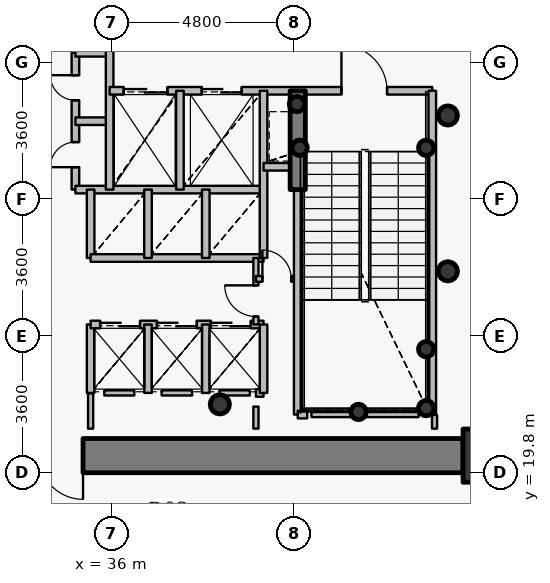
"""IFC4 building model, lengths in metres.
Left out: names, types, materials, properties, quantities, classifications, styles, units other than length and angle.
Written with IfcOpenShell. Run it as: python <this file> out.ifc"""

import sys

from ifc_helpers import new_model, si_unit, direction, frame, frame_2d, origin, origin_2d, place, context, subcontext, project, spatial, rectangle, hollow_circle, extrude, source, transform, mapped, element, fill, save


model = new_model("IFC4")
c1 = context("Model", 3, precision=1e-05, world=origin(), true_north=direction((0.0, 1.0)))
c2 = subcontext(c1, "Body", "Model", "MODEL_VIEW")
j1 = project(units=[si_unit("LENGTHUNIT", "METRE"), si_unit("PLANEANGLEUNIT", "RADIAN")], contexts=[c1])
p1 = place(None, origin())
s1 = spatial("IfcSite", under=j1, at=p1, CompositionType="ELEMENT")
p2 = place(p1, origin())
s2 = spatial("IfcBuilding", under=s1, at=p2, CompositionType="ELEMENT")
p3 = place(p2, frame((0.0, 0.0, 82.8)))
s3 = spatial("IfcBuildingStorey", under=s2, at=p3, CompositionType="ELEMENT", Elevation=82.8)
p4 = place(p3, frame((45.95, 20.25, 0.0), z_axis=(0.0, 0.0, 1.0), x_axis=(1.0, 0.0, 0.0)))
e1 = element("IfcColumn", 1, at=p4, inside=s3, PredefinedType="COLUMN", context=c2, shape_type="SweptSolid", body=[
    extrude(rectangle(XDim=1.4, YDim=1.4, at=origin_2d()), origin(), (0.0, 0.0, 1.0), 4.2),
])
p5 = place(p3, frame((38.85, 21.6, 0.0), z_axis=(0.0, 0.0, 1.0), x_axis=(1.0, 0.0, 0.0)))
e2 = element("IfcColumn", 2, at=p5, inside=s3, PredefinedType="COLUMN", context=c2, shape_type="SweptSolid", body=[
    extrude(hollow_circle(Radius=0.254, WallThickness=0.02, at=origin_2d()), origin(), (0.0, 0.0, 1.0), 4.2),
])
for number, where, z_axis, x_axis in (
    (3, (44.28, 21.5, 0.0), (0.0, 0.0, 1.0), (1.0, 0.0, 0.0)),
    (4, (44.28, 23.05, 0.0), (0.0, 0.0, 1.0), (1.0, 0.0, 0.0)),
    (5, (42.5, 21.4, 0.0), (0.0, 0.0, 1.0), (1.0, 0.0, 0.0)),
    (6, (40.95, 28.35, 0.0), (0.0, 0.0, 1.0), (1.0, 0.0, 0.0)),
    (7, (44.28, 28.35, 0.0), (0.0, 0.0, 1.0), (1.0, 0.0, 0.0)),
    (8, (40.88, 29.5, 0.0), (0.0, 0.0, 1.0), (1.0, 0.0, 0.0)),
):
    element("IfcColumn", number, at=place(p3, frame(where, z_axis=z_axis, x_axis=x_axis)), inside=s3, PredefinedType="COLUMN", context=c2, shape_type="SweptSolid", body=[
        extrude(hollow_circle(Radius=0.203, WallThickness=0.016, at=origin_2d()), origin(), (0.0, 0.0, 1.0), 4.2),
    ])
p6 = place(p3, frame((45.25, 20.25, 0.0), z_axis=(0.0, 0.0, 1.0), x_axis=(-1.0, 0.0, 0.0)))
e9 = element("IfcWall", 9, at=p6, inside=s3, PredefinedType="SHEAR", context=c2, shape_type="SweptSolid", body=[
    extrude(rectangle(XDim=18.5, YDim=0.9, at=frame_2d((9.25, 0.0))), origin(), (0.0, 0.0, 1.0), 3.35),
])
p7 = place(p6, frame((10.0, 0.0, 0.0)))
e10 = element("IfcOpeningElement", 10, at=p7, cuts=e9, PredefinedType="OPENING", context=c2, shape_type="SweptSolid", body=[
    extrude(rectangle(XDim=1.15, YDim=2.15, at=origin_2d()), frame((0.575, 0.46, 1.075), z_axis=(0.0, -1.0, 0.0), x_axis=(1.0, 0.0, 0.0)), (0.0, 0.0, 1.0), 0.92),
])
p8 = place(p3, frame((40.9, 27.25, 0.0), z_axis=(0.0, 0.0, 1.0), x_axis=(0.0, 1.0, 0.0)))
e11 = element("IfcWall", 11, at=p8, inside=s3, PredefinedType="SHEAR", context=c2, shape_type="SweptSolid", body=[
    extrude(rectangle(XDim=2.6, YDim=0.4, at=frame_2d((1.3, 0.0))), origin(), (0.0, 0.0, 1.0), 3.5),
])
for number, where, z_axis, x_axis in (
    (12, (44.85, 25.1, 0.0), (0.0, 0.0, 1.0), (1.0, 0.0, 0.0)),
    (13, (44.85, 29.2, 0.0), (0.0, 0.0, 1.0), (1.0, 0.0, 0.0)),
):
    element("IfcColumn", number, at=place(p3, frame(where, z_axis=z_axis, x_axis=x_axis)), inside=s3, PredefinedType="COLUMN", context=c2, shape_type="SweptSolid", body=[
        extrude(hollow_circle(Radius=0.254, WallThickness=0.02, at=origin_2d()), origin(), (0.0, 0.0, 1.0), 4.2),
    ])
p9 = place(p3, frame((35.05, 27.25, 0.0), z_axis=(0.0, 0.0, 1.0), x_axis=(0.0, 1.0, 0.0)))
e14 = element("IfcWall", 14, at=p9, inside=s3, PredefinedType="PARTITIONING", context=c2, shape_type="SweptSolid", body=[
    extrude(rectangle(XDim=3.6, YDim=0.2, at=frame_2d((1.8, 0.0))), origin(), (0.0, 0.0, 1.0), 3.9),
])
p10 = place(p9, frame((0.59, 0.0, 0.0)))
e15 = element("IfcOpeningElement", 15, at=p10, cuts=e14, PredefinedType="OPENING", context=c2, shape_type="SweptSolid", body=[
    extrude(rectangle(XDim=0.66, YDim=2.05, at=origin_2d()), frame((0.33, 0.11, 1.025), z_axis=(0.0, -1.0, 0.0), x_axis=(1.0, 0.0, 0.0)), (0.0, 0.0, 1.0), 0.22),
])
p11 = place(p9, frame((2.35, 0.0, 0.0)))
e16 = element("IfcOpeningElement", 16, at=p11, cuts=e14, PredefinedType="OPENING", context=c2, shape_type="SweptSolid", body=[
    extrude(rectangle(XDim=0.66, YDim=2.05, at=origin_2d()), frame((0.33, 0.11, 1.025), z_axis=(0.0, -1.0, 0.0), x_axis=(1.0, 0.0, 0.0)), (0.0, 0.0, 1.0), 0.22),
])
p12 = place(p3, frame((35.05, 27.25, 0.0), z_axis=(0.0, 0.0, 1.0), x_axis=(1.0, 0.0, 0.0)))
e17 = element("IfcWall", 17, at=p12, inside=s3, PredefinedType="PARTITIONING", context=c2, shape_type="SweptSolid", body=[
    extrude(rectangle(XDim=4.95, YDim=0.2, at=frame_2d((2.475, 0.0))), origin(), (0.0, 0.0, 1.0), 3.485),
])
for number, where, z_axis, x_axis in (
    (18, (35.05, 29.05, 0.0), (0.0, 0.0, 1.0), (1.0, 0.0, 0.0)),
    (19, (35.05, 30.85, 0.0), (0.0, 0.0, 1.0), (1.0, 0.0, 0.0)),
):
    element("IfcWall", number, at=place(p3, frame(where, z_axis=z_axis, x_axis=x_axis)), inside=s3, PredefinedType="PARTITIONING", context=c2, shape_type="SweptSolid", body=[
        extrude(rectangle(XDim=0.9, YDim=0.2, at=frame_2d((0.45, 0.0))), origin(), (0.0, 0.0, 1.0), 3.9),
    ])
p13 = place(p3, frame((35.45, 21.9, 0.0), z_axis=(0.0, 0.0, 1.0), x_axis=(0.0, 1.0, 0.0)))
e20 = element("IfcWall", 20, at=p13, inside=s3, PredefinedType="PARTITIONING", context=c2, shape_type="SweptSolid", body=[
    extrude(rectangle(XDim=1.8, YDim=0.2, at=frame_2d((0.9, 0.0))), origin(), (0.0, 0.0, 1.0), 3.9),
])
p14 = place(p3, frame((35.45, 23.7, 0.0), z_axis=(0.0, 0.0, 1.0), x_axis=(1.0, 0.0, 0.0)))
e21 = element("IfcWall", 21, at=p14, inside=s3, PredefinedType="PARTITIONING", context=c2, shape_type="SweptSolid", body=[
    extrude(rectangle(XDim=4.55, YDim=0.2, at=frame_2d((2.275, 0.0))), origin(), (0.0, 0.0, 1.0), 3.485),
])
p15 = place(p14, frame((0.25, 0.0, 0.0)))
e22 = element("IfcOpeningElement", 22, at=p15, cuts=e21, PredefinedType="OPENING", context=c2, shape_type="SweptSolid", body=[
    extrude(rectangle(XDim=1.05, YDim=2.15, at=origin_2d()), frame((0.525, 0.11, 1.075), z_axis=(0.0, -1.0, 0.0), x_axis=(1.0, 0.0, 0.0)), (0.0, 0.0, 1.0), 0.22),
])
p16 = place(p14, frame((1.745, 0.0, 0.0)))
e23 = element("IfcOpeningElement", 23, at=p16, cuts=e21, PredefinedType="OPENING", context=c2, shape_type="SweptSolid", body=[
    extrude(rectangle(XDim=1.05, YDim=2.15, at=origin_2d()), frame((0.525, 0.11, 1.075), z_axis=(0.0, -1.0, 0.0), x_axis=(1.0, 0.0, 0.0)), (0.0, 0.0, 1.0), 0.22),
])
p17 = place(p14, frame((3.165, 0.0, 0.0)))
e24 = element("IfcOpeningElement", 24, at=p17, cuts=e21, PredefinedType="OPENING", context=c2, shape_type="SweptSolid", body=[
    extrude(rectangle(XDim=1.05, YDim=2.15, at=origin_2d()), frame((0.525, 0.11, 1.075), z_axis=(0.0, -1.0, 0.0), x_axis=(1.0, 0.0, 0.0)), (0.0, 0.0, 1.0), 0.22),
])
p18 = place(p3, frame((35.45, 25.45, 0.0), z_axis=(0.0, 0.0, 1.0), x_axis=(0.0, 1.0, 0.0)))
e25 = element("IfcWall", 25, at=p18, inside=s3, PredefinedType="PARTITIONING", context=c2, shape_type="SweptSolid", body=[
    extrude(rectangle(XDim=1.8, YDim=0.2, at=frame_2d((0.9, 0.0))), origin(), (0.0, 0.0, 1.0), 3.9),
])
p19 = place(p3, frame((35.45, 25.45, 0.0), z_axis=(0.0, 0.0, 1.0), x_axis=(1.0, 0.0, 0.0)))
e26 = element("IfcWall", 26, at=p19, inside=s3, PredefinedType="PARTITIONING", context=c2, shape_type="SweptSolid", body=[
    extrude(rectangle(XDim=4.55, YDim=0.2, at=frame_2d((2.275, 0.0))), origin(), (0.0, 0.0, 1.0), 3.485),
])
p20 = place(p3, frame((35.95, 27.25, 0.0), z_axis=(0.0, 0.0, 1.0), x_axis=(0.0, 1.0, 0.0)))
e27 = element("IfcWall", 27, at=p20, inside=s3, PredefinedType="PARTITIONING", context=c2, shape_type="SweptSolid", body=[
    extrude(rectangle(XDim=3.8, YDim=0.2, at=frame_2d((1.9, 0.0))), origin(), (0.0, 0.0, 1.0), 3.9),
])
p21 = place(p3, frame((35.95, 29.85, 0.0), z_axis=(0.0, 0.0, 1.0), x_axis=(1.0, 0.0, 0.0)))
e28 = element("IfcWall", 28, at=p21, inside=s3, PredefinedType="PARTITIONING", context=c2, shape_type="SweptSolid", body=[
    extrude(rectangle(XDim=8.49, YDim=0.2, at=frame_2d((4.245, 0.0))), origin(), (0.0, 0.0, 1.0), 3.485),
])
p22 = place(p21, frame((6.1, 0.0, 0.0)))
e29 = element("IfcOpeningElement", 29, at=p22, cuts=e28, PredefinedType="OPENING", context=c2, shape_type="SweptSolid", body=[
    extrude(rectangle(XDim=1.2, YDim=2.15, at=origin_2d()), frame((0.6, 0.11, 1.075), z_axis=(0.0, -1.0, 0.0), x_axis=(1.0, 0.0, 0.0)), (0.0, 0.0, 1.0), 0.22),
])
p23 = place(p21, frame((0.37, 0.0, 0.0)))
e30 = element("IfcOpeningElement", 30, at=p23, cuts=e28, PredefinedType="OPENING", context=c2, shape_type="SweptSolid", body=[
    extrude(rectangle(XDim=1.15, YDim=2.15, at=origin_2d()), frame((0.575, 0.11, 1.075), z_axis=(0.0, -1.0, 0.0), x_axis=(1.0, 0.0, 0.0)), (0.0, 0.0, 1.0), 0.22),
])
p24 = place(p21, frame((2.425, 0.0, 0.0)))
e31 = element("IfcOpeningElement", 31, at=p24, cuts=e28, PredefinedType="OPENING", context=c2, shape_type="SweptSolid", body=[
    extrude(rectangle(XDim=1.05, YDim=2.15, at=origin_2d()), frame((0.525, 0.11, 1.075), z_axis=(0.0, -1.0, 0.0), x_axis=(1.0, 0.0, 0.0)), (0.0, 0.0, 1.0), 0.22),
])
for number, where, z_axis, x_axis in (
    (32, (36.96, 21.9, 0.0), (0.0, 0.0, 1.0), (0.0, 1.0, 0.0)),
    (33, (36.96, 25.45, 0.0), (0.0, 0.0, 1.0), (0.0, 1.0, 0.0)),
):
    element("IfcWall", number, at=place(p3, frame(where, z_axis=z_axis, x_axis=x_axis)), inside=s3, PredefinedType="PARTITIONING", context=c2, shape_type="SweptSolid", body=[
        extrude(rectangle(XDim=1.8, YDim=0.2, at=frame_2d((0.9, 0.0))), origin(), (0.0, 0.0, 1.0), 3.9),
    ])
p25 = place(p3, frame((37.8, 27.25, 0.0), z_axis=(0.0, 0.0, 1.0), x_axis=(0.0, 1.0, 0.0)))
e34 = element("IfcWall", 34, at=p25, inside=s3, PredefinedType="PARTITIONING", context=c2, shape_type="SweptSolid", body=[
    extrude(rectangle(XDim=2.6, YDim=0.2, at=frame_2d((1.3, 0.0))), origin(), (0.0, 0.0, 1.0), 3.9),
])
for number, where, z_axis, x_axis in (
    (35, (38.48, 21.9, 0.0), (0.0, 0.0, 1.0), (0.0, 1.0, 0.0)),
    (36, (38.48, 25.45, 0.0), (0.0, 0.0, 1.0), (0.0, 1.0, 0.0)),
):
    element("IfcWall", number, at=place(p3, frame(where, z_axis=z_axis, x_axis=x_axis)), inside=s3, PredefinedType="PARTITIONING", context=c2, shape_type="SweptSolid", body=[
        extrude(rectangle(XDim=1.8, YDim=0.2, at=frame_2d((0.9, 0.0))), origin(), (0.0, 0.0, 1.0), 3.9),
    ])
p26 = place(p3, frame((39.8, 21.9, 0.0), z_axis=(0.0, 0.0, 1.0), x_axis=(1.0, 0.0, 0.0)))
e37 = element("IfcWall", 37, at=p26, inside=s3, PredefinedType="PARTITIONING", context=c2, shape_type="SweptSolid", body=[
    extrude(rectangle(XDim=0.2, YDim=0.2, at=frame_2d((0.1, 0.0))), origin(), (0.0, 0.0, 1.0), 3.9),
])
p27 = place(p3, frame((39.8, 23.7, 0.0), z_axis=(0.0, 0.0, 1.0), x_axis=(0.0, 1.0, 0.0)))
e38 = element("IfcWall", 38, at=p27, inside=s3, PredefinedType="PARTITIONING", context=c2, shape_type="SweptSolid", body=[
    extrude(rectangle(XDim=1.75, YDim=0.135, at=frame_2d((0.875, 0.0))), origin(), (0.0, 0.0, 1.0), 3.9),
])
p28 = place(p27, frame((0.21, 0.0, 0.0)))
e39 = element("IfcOpeningElement", 39, at=p28, cuts=e38, PredefinedType="OPENING", context=c2, shape_type="SweptSolid", body=[
    extrude(rectangle(XDim=0.82, YDim=2.1, at=origin_2d()), frame((0.41, 0.078, 1.05), z_axis=(0.0, -1.0, 0.0), x_axis=(1.0, 0.0, 0.0)), (0.0, 0.0, 1.0), 0.155),
])
p29 = place(p3, frame((39.8, 24.9, 0.0), z_axis=(0.0, 0.0, 1.0), x_axis=(1.0, 0.0, 0.0)))
e40 = element("IfcWall", 40, at=p29, inside=s3, PredefinedType="PARTITIONING", context=c2, shape_type="SweptSolid", body=[
    extrude(rectangle(XDim=1.1, YDim=0.15, at=frame_2d((0.55, 0.0))), origin(), (0.0, 0.0, 1.0), 3.9),
])
p30 = place(p29, frame((0.17, 0.0, 0.0)))
e41 = element("IfcOpeningElement", 41, at=p30, cuts=e40, PredefinedType="OPENING", context=c2, shape_type="SweptSolid", body=[
    extrude(rectangle(XDim=0.76, YDim=2.1, at=origin_2d()), frame((0.38, 0.085, 1.05), z_axis=(0.0, -1.0, 0.0), x_axis=(1.0, 0.0, 0.0)), (0.0, 0.0, 1.0), 0.17),
])
p31 = place(p3, frame((40.0, 21.9, 0.0), z_axis=(0.0, 0.0, 1.0), x_axis=(0.0, 1.0, 0.0)))
e42 = element("IfcWall", 42, at=p31, inside=s3, PredefinedType="PARTITIONING", context=c2, shape_type="SweptSolid", body=[
    extrude(rectangle(XDim=1.8, YDim=0.2, at=frame_2d((0.9, 0.0))), origin(), (0.0, 0.0, 1.0), 3.9),
])
p32 = place(p3, frame((40.0, 25.45, 0.0), z_axis=(0.0, 0.0, 1.0), x_axis=(0.0, 1.0, 0.0)))
e43 = element("IfcWall", 43, at=p32, inside=s3, PredefinedType="PARTITIONING", context=c2, shape_type="SweptSolid", body=[
    extrude(rectangle(XDim=4.4, YDim=0.2, at=frame_2d((2.2, 0.0))), origin(), (0.0, 0.0, 1.0), 3.9),
])
p33 = place(p3, frame((40.0, 27.85, 0.0), z_axis=(0.0, 0.0, 1.0), x_axis=(1.0, 0.0, 0.0)))
e44 = element("IfcWall", 44, at=p33, inside=s3, PredefinedType="PARTITIONING", context=c2, shape_type="SweptSolid", body=[
    extrude(rectangle(XDim=0.9, YDim=0.2, at=frame_2d((0.45, 0.0))), origin(), (0.0, 0.0, 1.0), 3.9),
])
p34 = place(p3, frame((40.9, 21.33, 0.0), z_axis=(0.0, 0.0, 1.0), x_axis=(0.0, 1.0, 0.0)))
e45 = element("IfcWall", 45, at=p34, inside=s3, PredefinedType="PARTITIONING", context=c2, shape_type="SweptSolid", body=[
    extrude(rectangle(XDim=5.91, YDim=0.2, at=frame_2d((2.955, 0.0))), origin(), (0.0, 0.0, 1.0), 3.435),
])
p35 = place(p3, frame((40.9, 21.33, 0.0), z_axis=(0.0, 0.0, 1.0), x_axis=(1.0, 0.0, 0.0)))
e46 = element("IfcWall", 46, at=p35, inside=s3, PredefinedType="PARTITIONING", context=c2, shape_type="SweptSolid", body=[
    extrude(rectangle(XDim=0.25, YDim=0.2, at=frame_2d((0.125, 0.0))), origin(), (0.0, 0.0, 1.0), 3.435),
])
p36 = place(p3, frame((44.44, 21.33, 0.0), z_axis=(0.0, 0.0, 1.0), x_axis=(0.0, 1.0, 0.0)))
e47 = element("IfcWall", 47, at=p36, inside=s3, PredefinedType="PARTITIONING", context=c2, shape_type="SweptSolid", body=[
    extrude(rectangle(XDim=8.52, YDim=0.2, at=frame_2d((4.26, 0.0))), origin(), (0.0, 0.0, 1.0), 3.9),
])
p37 = place(p3, frame((44.08, 21.33, 0.0), z_axis=(0.0, 0.0, 1.0), x_axis=(-1.0, 0.0, 0.0)))
e48 = element("IfcWall", 48, at=p37, inside=s3, PredefinedType="PARTITIONING", context=c2, shape_type="SweptSolid", body=[
    extrude(rectangle(XDim=2.82, YDim=0.135, at=frame_2d((1.41, 0.0))), origin(), (0.0, 0.0, 1.0), 3.435),
])
p38 = place(p3, frame((36.6, 21.9, 0.0), z_axis=(0.0, 0.0, 1.0), x_axis=(-1.0, 0.0, 0.0)))
e49 = element("IfcWall", 49, at=p38, inside=s3, PredefinedType="PARTITIONING", context=c2, shape_type="SweptSolid", body=[
    extrude(rectangle(XDim=0.79, YDim=0.135, at=frame_2d((0.395, 0.0))), origin(), (0.0, 0.0, 1.0), 3.9),
])
p39 = place(p3, frame((38.12, 21.9, 0.0), z_axis=(0.0, 0.0, 1.0), x_axis=(-1.0, 0.0, 0.0)))
e50 = element("IfcWall", 50, at=p39, inside=s3, PredefinedType="PARTITIONING", context=c2, shape_type="SweptSolid", body=[
    extrude(rectangle(XDim=0.8, YDim=0.135, at=frame_2d((0.4, 0.0))), origin(), (0.0, 0.0, 1.0), 3.9),
])
p40 = place(p3, frame((39.64, 21.9, 0.0), z_axis=(0.0, 0.0, 1.0), x_axis=(-1.0, 0.0, 0.0)))
e51 = element("IfcWall", 51, at=p40, inside=s3, PredefinedType="PARTITIONING", context=c2, shape_type="SweptSolid", body=[
    extrude(rectangle(XDim=0.8, YDim=0.135, at=frame_2d((0.4, 0.0))), origin(), (0.0, 0.0, 1.0), 3.485),
])
p41 = place(p3, frame((39.8, 20.96, 0.0), z_axis=(0.0, 0.0, 1.0), x_axis=(0.0, 1.0, 0.0)))
e52 = element("IfcWall", 52, at=p41, inside=s3, PredefinedType="PARTITIONING", context=c2, shape_type="SweptSolid", body=[
    extrude(rectangle(XDim=0.58, YDim=0.135, at=frame_2d((0.29, 0.0))), origin(), (0.0, 0.0, 1.0), 3.435),
])
p42 = place(p3, frame((44.5, 20.96, 0.0), z_axis=(0.0, 0.0, 1.0), x_axis=(0.0, 1.0, 0.0)))
e53 = element("IfcWall", 53, at=p42, inside=s3, PredefinedType="PARTITIONING", context=c2, shape_type="SweptSolid", body=[
    extrude(rectangle(XDim=0.36, YDim=0.135, at=frame_2d((0.18, 0.0))), origin(), (0.0, 0.0, 1.0), 3.9),
])
p43 = place(p3, frame((35.45, 21.89, 0.0), z_axis=(0.0, 0.0, 1.0), x_axis=(0.0, -1.0, 0.0)))
e54 = element("IfcWall", 54, at=p43, inside=s3, PredefinedType="PARTITIONING", context=c2, shape_type="SweptSolid", body=[
    extrude(rectangle(XDim=0.93, YDim=0.135, at=frame_2d((0.465, 0.0))), origin(), (0.0, 0.0, 1.0), 3.485),
])
p44 = place(p3, frame((45.26, 19.8, 0.0), z_axis=(0.0, 0.0, 1.0), x_axis=(1.0, 0.0, 0.0)))
e55 = element("IfcWall", 55, at=p44, inside=s3, PredefinedType="PARTITIONING", context=c2, shape_type="SweptSolid", body=[
    extrude(rectangle(XDim=1.14, YDim=0.135, at=frame_2d((0.57, 0.0))), origin(), (0.0, 0.0, 1.0), 3.235),
])
m1 = source(origin(), c2, "Body", "SweptSolid", [
    extrude(rectangle(XDim=1.15, YDim=2.15, at=origin_2d()), frame((0.575, 0.025, 1.075), z_axis=(0.0, -1.0, 0.0), x_axis=(1.0, 0.0, 0.0)), (0.0, 0.0, 1.0), 0.05),
])
p45 = place(p7, origin())
e56 = element("IfcDoor", 56, at=p45, inside=s3, OperationType="SINGLE_SWING_LEFT", PredefinedType="DOOR", context=c2, shape_type="MappedRepresentation", body=[
    mapped(m1, transform((0.0, 0.0, 0.0), x_axis=(1.0, 0.0, 0.0), y_axis=(0.0, 1.0, 0.0), z_axis=(0.0, 0.0, 1.0), scale=1.0)),
])
fill(e10, e56)
m2 = source(origin(), c2, "Body", "SweptSolid", [
    extrude(rectangle(XDim=1.2, YDim=2.15, at=origin_2d()), frame((0.6, 0.025, 1.075), z_axis=(0.0, -1.0, 0.0), x_axis=(1.0, 0.0, 0.0)), (0.0, 0.0, 1.0), 0.05),
])
p46 = place(p22, origin())
e57 = element("IfcDoor", 57, at=p46, inside=s3, OperationType="SINGLE_SWING_LEFT", PredefinedType="DOOR", context=c2, shape_type="MappedRepresentation", body=[
    mapped(m2, transform((0.0, 0.0, 0.0), x_axis=(1.0, 0.0, 0.0), y_axis=(0.0, 1.0, 0.0), z_axis=(0.0, 0.0, 1.0), scale=1.0)),
])
fill(e29, e57)
m3 = source(origin(), c2, "Body", "SweptSolid", [
    extrude(rectangle(XDim=1.15, YDim=2.15, at=origin_2d()), frame((0.575, 0.025, 1.075), z_axis=(0.0, -1.0, 0.0), x_axis=(1.0, 0.0, 0.0)), (0.0, 0.0, 1.0), 0.05),
])
p47 = place(p23, origin())
e58 = element("IfcDoor", 58, at=p47, inside=s3, OperationType="DOUBLE_DOOR_SLIDING", PredefinedType="USERDEFINED", context=c2, shape_type="MappedRepresentation", body=[
    mapped(m3, transform((0.0, 0.0, 0.0), x_axis=(1.0, 0.0, 0.0), y_axis=(0.0, 1.0, 0.0), z_axis=(0.0, 0.0, 1.0), scale=1.0)),
])
fill(e30, e58)
m4 = source(origin(), c2, "Body", "SweptSolid", [
    extrude(rectangle(XDim=1.05, YDim=2.15, at=origin_2d()), frame((0.525, 0.025, 1.075), z_axis=(0.0, -1.0, 0.0), x_axis=(1.0, 0.0, 0.0)), (0.0, 0.0, 1.0), 0.05),
])
p48 = place(p24, origin())
e59 = element("IfcDoor", 59, at=p48, inside=s3, OperationType="DOUBLE_DOOR_SLIDING", PredefinedType="USERDEFINED", context=c2, shape_type="MappedRepresentation", body=[
    mapped(m4, transform((0.0, 0.0, 0.0), x_axis=(1.0, 0.0, 0.0), y_axis=(0.0, 1.0, 0.0), z_axis=(0.0, 0.0, 1.0), scale=1.0)),
])
fill(e31, e59)
p49 = place(p15, origin())
e60 = element("IfcDoor", 60, at=p49, inside=s3, OperationType="DOUBLE_DOOR_SLIDING", PredefinedType="USERDEFINED", context=c2, shape_type="MappedRepresentation", body=[
    mapped(m4, transform((0.0, 0.0, 0.0), x_axis=(1.0, 0.0, 0.0), y_axis=(0.0, 1.0, 0.0), z_axis=(0.0, 0.0, 1.0), scale=1.0)),
])
fill(e22, e60)
p50 = place(p16, origin())
e61 = element("IfcDoor", 61, at=p50, inside=s3, OperationType="DOUBLE_DOOR_SLIDING", PredefinedType="USERDEFINED", context=c2, shape_type="MappedRepresentation", body=[
    mapped(m4, transform((0.0, 0.0, 0.0), x_axis=(1.0, 0.0, 0.0), y_axis=(0.0, 1.0, 0.0), z_axis=(0.0, 0.0, 1.0), scale=1.0)),
])
fill(e23, e61)
p51 = place(p17, origin())
e62 = element("IfcDoor", 62, at=p51, inside=s3, OperationType="DOUBLE_DOOR_SLIDING", PredefinedType="USERDEFINED", context=c2, shape_type="MappedRepresentation", body=[
    mapped(m4, transform((0.0, 0.0, 0.0), x_axis=(1.0, 0.0, 0.0), y_axis=(0.0, 1.0, 0.0), z_axis=(0.0, 0.0, 1.0), scale=1.0)),
])
fill(e24, e62)
m5 = source(origin(), c2, "Body", "SweptSolid", [
    extrude(rectangle(XDim=0.66, YDim=2.05, at=origin_2d()), frame((0.33, 0.025, 1.025), z_axis=(0.0, -1.0, 0.0), x_axis=(1.0, 0.0, 0.0)), (0.0, 0.0, 1.0), 0.05),
])
p52 = place(p10, origin())
e63 = element("IfcDoor", 63, at=p52, inside=s3, OperationType="SINGLE_SWING_LEFT", PredefinedType="USERDEFINED", context=c2, shape_type="MappedRepresentation", body=[
    mapped(m5, transform((0.0, 0.0, 0.0), x_axis=(1.0, 0.0, 0.0), y_axis=(0.0, 1.0, 0.0), z_axis=(0.0, 0.0, 1.0), scale=1.0)),
])
fill(e15, e63)
p53 = place(p11, origin())
e64 = element("IfcDoor", 64, at=p53, inside=s3, OperationType="SINGLE_SWING_RIGHT", PredefinedType="USERDEFINED", context=c2, shape_type="MappedRepresentation", body=[
    mapped(m5, transform((0.0, 0.0, 0.0), x_axis=(1.0, 0.0, 0.0), y_axis=(0.0, 1.0, 0.0), z_axis=(0.0, 0.0, 1.0), scale=1.0)),
])
fill(e16, e64)
m6 = source(origin(), c2, "Body", "SweptSolid", [
    extrude(rectangle(XDim=0.82, YDim=2.1, at=origin_2d()), frame((0.41, 0.025, 1.05), z_axis=(0.0, -1.0, 0.0), x_axis=(1.0, 0.0, 0.0)), (0.0, 0.0, 1.0), 0.05),
])
p54 = place(p28, origin())
e65 = element("IfcDoor", 65, at=p54, inside=s3, OperationType="SINGLE_SWING_RIGHT", PredefinedType="DOOR", context=c2, shape_type="MappedRepresentation", body=[
    mapped(m6, transform((0.0, 0.0, 0.0), x_axis=(1.0, 0.0, 0.0), y_axis=(0.0, 1.0, 0.0), z_axis=(0.0, 0.0, 1.0), scale=1.0)),
])
fill(e39, e65)
m7 = source(origin(), c2, "Body", "SweptSolid", [
    extrude(rectangle(XDim=0.76, YDim=2.1, at=origin_2d()), frame((0.38, 0.025, 1.05), z_axis=(0.0, -1.0, 0.0), x_axis=(1.0, 0.0, 0.0)), (0.0, 0.0, 1.0), 0.05),
])
p55 = place(p30, origin())
e66 = element("IfcDoor", 66, at=p55, inside=s3, OperationType="SINGLE_SWING_LEFT", PredefinedType="DOOR", context=c2, shape_type="MappedRepresentation", body=[
    mapped(m7, transform((0.0, 0.0, 0.0), x_axis=(1.0, 0.0, 0.0), y_axis=(0.0, 1.0, 0.0), z_axis=(0.0, 0.0, 1.0), scale=1.0)),
])
fill(e41, e66)
save(model, sys.argv[1])
